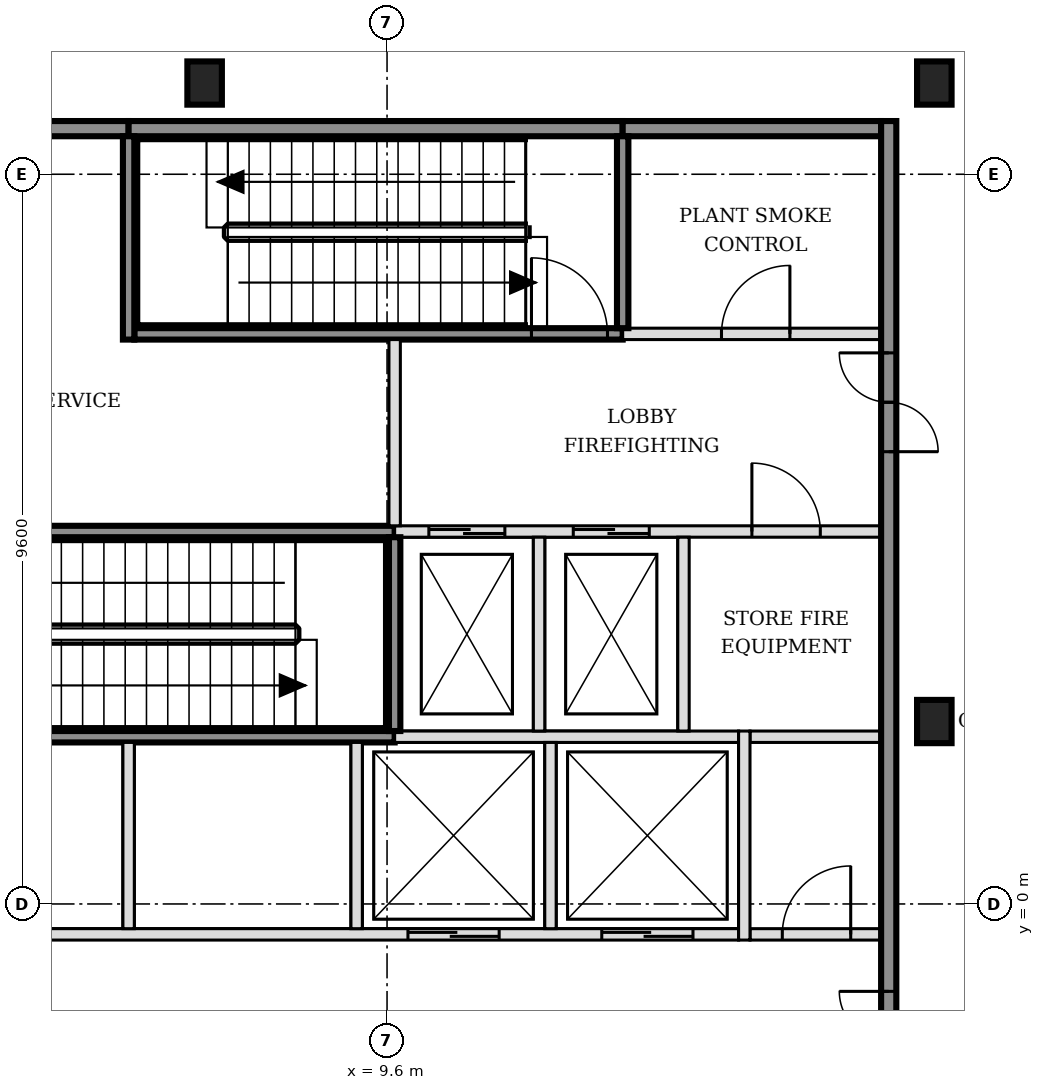
"""IFC4 building model, lengths in metres.
Left out: names, types, materials, properties, quantities, classifications, styles, units other than length and angle.
Written with IfcOpenShell. Run it as: python <this file> out.ifc"""

import sys

from ifc_helpers import new_model, si_unit, direction, frame, frame_2d, origin, origin_2d, place, context, subcontext, project, spatial, rectangle, i_section, extrude, element, fill, save


model = new_model("IFC4")
c1 = context("Model", 3, precision=1e-05, world=origin(), true_north=direction((0.0, 1.0)))
c2 = subcontext(c1, "Body", "Model", "MODEL_VIEW")
j1 = project(units=[si_unit("LENGTHUNIT", "METRE"), si_unit("PLANEANGLEUNIT", "RADIAN")], contexts=[c1])
p1 = place(None, origin())
s1 = spatial("IfcSite", under=j1, at=p1, CompositionType="ELEMENT")
p2 = place(p1, origin())
s2 = spatial("IfcBuilding", under=s1, at=p2, CompositionType="ELEMENT")
p3 = place(p2, frame((0.0, 0.0, 21.0)))
s3 = spatial("IfcBuildingStorey", under=s2, at=p3, CompositionType="ELEMENT", Elevation=21.0)
for number, where, z_axis, x_axis in (
    (1, (16.8, 2.4, -0.2), (0.0, 0.0, 1.0), (1.0, 0.0, 0.0)),
    (2, (7.2, 10.8, -0.2), (0.0, 0.0, 1.0), (1.0, 0.0, 0.0)),
    (3, (16.8, 10.8, -0.2), (0.0, 0.0, 1.0), (1.0, 0.0, 0.0)),
):
    element("IfcColumn", number, at=place(p3, frame(where, z_axis=z_axis, x_axis=x_axis)), inside=s3, PredefinedType="COLUMN", context=c2, shape_type="SweptSolid", body=[
        extrude(i_section(OverallWidth=0.454, OverallDepth=0.569, WebThickness=0.078, FlangeThickness=0.125, FilletRadius=0.015, at=origin_2d()), origin(), (0.0, 0.0, 1.0), 4.8),
    ])
p4 = place(p3, frame((-1.7, -0.4, 0.0), z_axis=(0.0, 0.0, 1.0), x_axis=(1.0, 0.0, 0.0)))
e4 = element("IfcWall", 4, at=p4, inside=s3, PredefinedType="SOLIDWALL", context=c2, shape_type="SweptSolid", body=[
    extrude(rectangle(XDim=15.925, YDim=0.15, at=frame_2d((7.962, 0.0))), origin(), (0.0, 0.0, 1.0), 4.6),
])
p5 = place(p4, frame((0.6, 0.0, 0.0)))
e5 = element("IfcOpeningElement", 5, at=p5, cuts=e4, PredefinedType="OPENING", context=c2, shape_type="SweptSolid", body=[
    extrude(rectangle(XDim=1.1, YDim=2.1, at=frame_2d((0.55, 1.05))), frame((0.0, 0.085, 0.0), z_axis=(0.0, -1.0, 0.0), x_axis=(1.0, 0.0, 0.0)), (0.0, 0.0, 1.0), 0.17),
])
p6 = place(p4, frame((3.1, 0.0, 0.0)))
e6 = element("IfcOpeningElement", 6, at=p6, cuts=e4, PredefinedType="OPENING", context=c2, shape_type="SweptSolid", body=[
    extrude(rectangle(XDim=1.1, YDim=2.1, at=frame_2d((0.55, 1.05))), frame((0.0, 0.085, 0.0), z_axis=(0.0, -1.0, 0.0), x_axis=(1.0, 0.0, 0.0)), (0.0, 0.0, 1.0), 0.17),
])
p7 = place(p4, frame((11.575, 0.0, 0.0)))
e7 = element("IfcOpeningElement", 7, at=p7, cuts=e4, PredefinedType="OPENING", context=c2, shape_type="SweptSolid", body=[
    extrude(rectangle(XDim=1.2, YDim=2.1, at=frame_2d((0.6, 1.05))), frame((0.0, 0.085, 0.0), z_axis=(0.0, -1.0, 0.0), x_axis=(1.0, 0.0, 0.0)), (0.0, 0.0, 1.0), 0.17),
])
p8 = place(p4, frame((14.125, 0.0, 0.0)))
e8 = element("IfcOpeningElement", 8, at=p8, cuts=e4, PredefinedType="OPENING", context=c2, shape_type="SweptSolid", body=[
    extrude(rectangle(XDim=1.2, YDim=2.1, at=frame_2d((0.6, 1.05))), frame((0.0, 0.085, 0.0), z_axis=(0.0, -1.0, 0.0), x_axis=(1.0, 0.0, 0.0)), (0.0, 0.0, 1.0), 0.17),
])
p9 = place(p3, frame((14.375, -0.4, 0.0), z_axis=(0.0, 0.0, 1.0), x_axis=(1.0, 0.0, 0.0)))
e9 = element("IfcWall", 9, at=p9, inside=s3, PredefinedType="PARTITIONING", context=c2, shape_type="SweptSolid", body=[
    extrude(rectangle(XDim=1.725, YDim=0.15, at=frame_2d((0.863, 0.0))), origin(), (0.0, 0.0, 1.0), 4.6),
])
p10 = place(p9, frame((0.425, 0.0, 0.0)))
e10 = element("IfcOpeningElement", 10, at=p10, cuts=e9, PredefinedType="OPENING", context=c2, shape_type="SweptSolid", body=[
    extrude(rectangle(XDim=0.9, YDim=2.1, at=frame_2d((0.45, 1.05))), frame((0.0, 0.085, 0.0), z_axis=(0.0, -1.0, 0.0), x_axis=(1.0, 0.0, 0.0)), (0.0, 0.0, 1.0), 0.17),
])
p11 = place(p3, frame((3.2, 2.2, 0.0), z_axis=(0.0, 0.0, 1.0), x_axis=(1.0, 0.0, 0.0)))
e11 = element("IfcWall", 11, at=p11, inside=s3, PredefinedType="SOLIDWALL", context=c2, shape_type="SweptSolid", body=[
    extrude(rectangle(XDim=6.5, YDim=0.15, at=frame_2d((3.25, 0.0))), origin(), (0.0, 0.0, 1.0), 4.6),
])
p12 = place(p3, frame((9.7, 2.2, 0.0), z_axis=(0.0, 0.0, 1.0), x_axis=(1.0, 0.0, 0.0)))
e12 = element("IfcWall", 12, at=p12, inside=s3, PredefinedType="SOLIDWALL", context=c2, shape_type="SweptSolid", body=[
    extrude(rectangle(XDim=4.525, YDim=0.15, at=frame_2d((2.263, 0.0))), origin(), (0.0, 0.0, 1.0), 4.6),
])
p13 = place(p3, frame((14.375, 2.2, 0.0), z_axis=(0.0, 0.0, 1.0), x_axis=(1.0, 0.0, 0.0)))
e13 = element("IfcWall", 13, at=p13, inside=s3, PredefinedType="PARTITIONING", context=c2, shape_type="SweptSolid", body=[
    extrude(rectangle(XDim=1.725, YDim=0.15, at=frame_2d((0.863, 0.0))), origin(), (0.0, 0.0, 1.0), 4.6),
])
p14 = place(p3, frame((3.275, 4.9, 0.0), z_axis=(0.0, 0.0, 1.0), x_axis=(1.0, 0.0, 0.0)))
e14 = element("IfcWall", 14, at=p14, inside=s3, PredefinedType="SOLIDWALL", context=c2, shape_type="SweptSolid", body=[
    extrude(rectangle(XDim=6.425, YDim=0.15, at=frame_2d((3.212, 0.0))), origin(), (0.0, 0.0, 1.0), 4.6),
])
p15 = place(p14, frame((0.1, 0.0, 0.0)))
e15 = element("IfcOpeningElement", 15, at=p15, cuts=e14, PredefinedType="OPENING", context=c2, shape_type="SweptSolid", body=[
    extrude(rectangle(XDim=1.0, YDim=2.1, at=frame_2d((0.5, 1.05))), frame((0.0, 0.085, 0.0), z_axis=(0.0, -1.0, 0.0), x_axis=(1.0, 0.0, 0.0)), (0.0, 0.0, 1.0), 0.17),
])
p16 = place(p3, frame((9.7, 4.9, 0.0), z_axis=(0.0, 0.0, 1.0), x_axis=(1.0, 0.0, 0.0)))
e16 = element("IfcWall", 16, at=p16, inside=s3, PredefinedType="SOLIDWALL", context=c2, shape_type="SweptSolid", body=[
    extrude(rectangle(XDim=6.4, YDim=0.15, at=frame_2d((3.2, 0.0))), origin(), (0.0, 0.0, 1.0), 4.6),
])
p17 = place(p16, frame((0.45, 0.0, 0.0)))
e17 = element("IfcOpeningElement", 17, at=p17, cuts=e16, PredefinedType="OPENING", context=c2, shape_type="SweptSolid", body=[
    extrude(rectangle(XDim=1.0, YDim=2.1, at=frame_2d((0.5, 1.05))), frame((0.0, 0.085, 0.0), z_axis=(0.0, -1.0, 0.0), x_axis=(1.0, 0.0, 0.0)), (0.0, 0.0, 1.0), 0.17),
])
p18 = place(p16, frame((2.35, 0.0, 0.0)))
e18 = element("IfcOpeningElement", 18, at=p18, cuts=e16, PredefinedType="OPENING", context=c2, shape_type="SweptSolid", body=[
    extrude(rectangle(XDim=1.0, YDim=2.1, at=frame_2d((0.5, 1.05))), frame((0.0, 0.085, 0.0), z_axis=(0.0, -1.0, 0.0), x_axis=(1.0, 0.0, 0.0)), (0.0, 0.0, 1.0), 0.17),
])
p19 = place(p16, frame((4.7, 0.0, 0.0)))
e19 = element("IfcOpeningElement", 19, at=p19, cuts=e16, PredefinedType="OPENING", context=c2, shape_type="SweptSolid", body=[
    extrude(rectangle(XDim=0.9, YDim=2.1, at=frame_2d((0.45, 1.05))), frame((0.0, 0.085, 0.0), z_axis=(0.0, -1.0, 0.0), x_axis=(1.0, 0.0, 0.0)), (0.0, 0.0, 1.0), 0.17),
])
p20 = place(p3, frame((6.275, 7.5, 0.0), z_axis=(0.0, 0.0, 1.0), x_axis=(1.0, 0.0, 0.0)))
e20 = element("IfcWall", 20, at=p20, inside=s3, PredefinedType="SOLIDWALL", context=c2, shape_type="SweptSolid", body=[
    extrude(rectangle(XDim=6.425, YDim=0.15, at=frame_2d((3.212, 0.0))), origin(), (0.0, 0.0, 1.0), 4.6),
])
p21 = place(p20, frame((5.225, 0.0, 0.0)))
e21 = element("IfcOpeningElement", 21, at=p21, cuts=e20, PredefinedType="OPENING", context=c2, shape_type="SweptSolid", body=[
    extrude(rectangle(XDim=1.0, YDim=2.1, at=frame_2d((0.5, 1.05))), frame((0.0, 0.085, 0.0), z_axis=(0.0, -1.0, 0.0), x_axis=(1.0, 0.0, 0.0)), (0.0, 0.0, 1.0), 0.17),
])
p22 = place(p3, frame((12.7, 7.5, 0.0), z_axis=(0.0, 0.0, 1.0), x_axis=(1.0, 0.0, 0.0)))
e22 = element("IfcWall", 22, at=p22, inside=s3, PredefinedType="SOLIDWALL", context=c2, shape_type="SweptSolid", body=[
    extrude(rectangle(XDim=3.4, YDim=0.15, at=frame_2d((1.7, 0.0))), origin(), (0.0, 0.0, 1.0), 4.6),
])
p23 = place(p22, frame((1.3, 0.0, 0.0)))
e23 = element("IfcOpeningElement", 23, at=p23, cuts=e22, PredefinedType="OPENING", context=c2, shape_type="SweptSolid", body=[
    extrude(rectangle(XDim=0.9, YDim=2.1, at=frame_2d((0.45, 1.05))), frame((0.0, 0.085, 0.0), z_axis=(0.0, -1.0, 0.0), x_axis=(1.0, 0.0, 0.0)), (0.0, 0.0, 1.0), 0.17),
])
p24 = place(p3, frame((-1.7, 10.2, 0.0), z_axis=(0.0, 0.0, 1.0), x_axis=(1.0, 0.0, 0.0)))
e24 = element("IfcWall", 24, at=p24, inside=s3, PredefinedType="SOLIDWALL", context=c2, shape_type="SweptSolid", body=[
    extrude(rectangle(XDim=7.9, YDim=0.2, at=frame_2d((3.95, 0.0))), origin(), (0.0, 0.0, 1.0), 4.6),
])
p25 = place(p3, frame((6.2, 10.2, 0.0), z_axis=(0.0, 0.0, 1.0), x_axis=(1.0, 0.0, 0.0)))
e25 = element("IfcWall", 25, at=p25, inside=s3, PredefinedType="SOLIDWALL", context=c2, shape_type="SweptSolid", body=[
    extrude(rectangle(XDim=6.5, YDim=0.2, at=frame_2d((3.25, 0.0))), origin(), (0.0, 0.0, 1.0), 4.6),
])
p26 = place(p3, frame((12.7, 10.2, 0.0), z_axis=(0.0, 0.0, 1.0), x_axis=(1.0, 0.0, 0.0)))
e26 = element("IfcWall", 26, at=p26, inside=s3, PredefinedType="SOLIDWALL", context=c2, shape_type="SweptSolid", body=[
    extrude(rectangle(XDim=3.4, YDim=0.2, at=frame_2d((1.7, 0.0))), origin(), (0.0, 0.0, 1.0), 4.6),
])
p27 = place(p3, frame((6.2, -0.325, 0.0), z_axis=(0.0, 0.0, 1.0), x_axis=(0.0, 1.0, 0.0)))
e27 = element("IfcWall", 27, at=p27, inside=s3, PredefinedType="SOLIDWALL", context=c2, shape_type="SweptSolid", body=[
    extrude(rectangle(XDim=2.45, YDim=0.15, at=frame_2d((1.225, 0.0))), origin(), (0.0, 0.0, 1.0), 4.6),
])
p28 = place(p3, frame((6.2, 7.425, 0.0), z_axis=(0.0, 0.0, 1.0), x_axis=(0.0, 1.0, 0.0)))
e28 = element("IfcWall", 28, at=p28, inside=s3, PredefinedType="SOLIDWALL", context=c2, shape_type="SweptSolid", body=[
    extrude(rectangle(XDim=2.675, YDim=0.15, at=frame_2d((1.337, 0.0))), origin(), (0.0, 0.0, 1.0), 4.6),
])
p29 = place(p3, frame((9.2, -0.325, 0.0), z_axis=(0.0, 0.0, 1.0), x_axis=(0.0, 1.0, 0.0)))
e29 = element("IfcWall", 29, at=p29, inside=s3, PredefinedType="SOLIDWALL", context=c2, shape_type="SweptSolid", body=[
    extrude(rectangle(XDim=2.45, YDim=0.15, at=frame_2d((1.225, 0.0))), origin(), (0.0, 0.0, 1.0), 4.6),
])
p30 = place(p3, frame((9.7, 2.275, 0.0), z_axis=(0.0, 0.0, 1.0), x_axis=(0.0, 1.0, 0.0)))
e30 = element("IfcWall", 30, at=p30, inside=s3, PredefinedType="SOLIDWALL", context=c2, shape_type="SweptSolid", body=[
    extrude(rectangle(XDim=2.55, YDim=0.15, at=frame_2d((1.275, 0.0))), origin(), (0.0, 0.0, 1.0), 4.6),
])
p31 = place(p3, frame((9.7, 4.975, 0.0), z_axis=(0.0, 0.0, 1.0), x_axis=(0.0, 1.0, 0.0)))
e31 = element("IfcWall", 31, at=p31, inside=s3, PredefinedType="SOLIDWALL", context=c2, shape_type="SweptSolid", body=[
    extrude(rectangle(XDim=2.45, YDim=0.15, at=frame_2d((1.225, 0.0))), origin(), (0.0, 0.0, 1.0), 4.6),
])
p32 = place(p3, frame((11.6, 2.275, 0.0), z_axis=(0.0, 0.0, 1.0), x_axis=(0.0, 1.0, 0.0)))
e32 = element("IfcWall", 32, at=p32, inside=s3, PredefinedType="SOLIDWALL", context=c2, shape_type="SweptSolid", body=[
    extrude(rectangle(XDim=2.55, YDim=0.15, at=frame_2d((1.275, 0.0))), origin(), (0.0, 0.0, 1.0), 4.6),
])
p33 = place(p3, frame((11.75, -0.325, 0.0), z_axis=(0.0, 0.0, 1.0), x_axis=(0.0, 1.0, 0.0)))
e33 = element("IfcWall", 33, at=p33, inside=s3, PredefinedType="SOLIDWALL", context=c2, shape_type="SweptSolid", body=[
    extrude(rectangle(XDim=2.45, YDim=0.15, at=frame_2d((1.225, 0.0))), origin(), (0.0, 0.0, 1.0), 4.6),
])
p34 = place(p3, frame((12.7, 7.575, 0.0), z_axis=(0.0, 0.0, 1.0), x_axis=(0.0, 1.0, 0.0)))
e34 = element("IfcWall", 34, at=p34, inside=s3, PredefinedType="SOLIDWALL", context=c2, shape_type="SweptSolid", body=[
    extrude(rectangle(XDim=2.525, YDim=0.15, at=frame_2d((1.263, 0.0))), origin(), (0.0, 0.0, 1.0), 4.6),
])
p35 = place(p3, frame((13.5, 2.275, 0.0), z_axis=(0.0, 0.0, 1.0), x_axis=(0.0, 1.0, 0.0)))
e35 = element("IfcWall", 35, at=p35, inside=s3, PredefinedType="SOLIDWALL", context=c2, shape_type="SweptSolid", body=[
    extrude(rectangle(XDim=2.55, YDim=0.15, at=frame_2d((1.275, 0.0))), origin(), (0.0, 0.0, 1.0), 4.6),
])
p36 = place(p3, frame((14.3, -0.475, 0.0), z_axis=(0.0, 0.0, 1.0), x_axis=(0.0, 1.0, 0.0)))
e36 = element("IfcWall", 36, at=p36, inside=s3, PredefinedType="SOLIDWALL", context=c2, shape_type="SweptSolid", body=[
    extrude(rectangle(XDim=2.75, YDim=0.15, at=frame_2d((1.375, 0.0))), origin(), (0.0, 0.0, 1.0), 4.6),
])
p37 = place(p3, frame((16.2, -5.5, 0.0), z_axis=(0.0, 0.0, 1.0), x_axis=(0.0, 1.0, 0.0)))
e37 = element("IfcWall", 37, at=p37, inside=s3, PredefinedType="SOLIDWALL", context=c2, shape_type="SweptSolid", body=[
    extrude(rectangle(XDim=15.8, YDim=0.2, at=frame_2d((7.9, 0.0))), origin(), (0.0, 0.0, 1.0), 4.6),
])
p38 = place(p37, frame((3.05, 0.0, 0.0)))
e38 = element("IfcOpeningElement", 38, at=p38, cuts=e37, PredefinedType="OPENING", context=c2, shape_type="SweptSolid", body=[
    extrude(rectangle(XDim=1.3, YDim=2.1, at=frame_2d((0.65, 1.05))), frame((0.0, 0.11, 0.0), z_axis=(0.0, -1.0, 0.0), x_axis=(1.0, 0.0, 0.0)), (0.0, 0.0, 1.0), 0.22),
])
p39 = place(p37, frame((11.45, 0.0, 0.0)))
e39 = element("IfcOpeningElement", 39, at=p39, cuts=e37, PredefinedType="OPENING", context=c2, shape_type="SweptSolid", body=[
    extrude(rectangle(XDim=1.3, YDim=2.1, at=frame_2d((0.65, 1.05))), frame((0.0, 0.11, 0.0), z_axis=(0.0, -1.0, 0.0), x_axis=(1.0, 0.0, 0.0)), (0.0, 0.0, 1.0), 0.22),
])
p40 = place(p7, origin())
e40 = element("IfcDoor", 40, at=p40, inside=s3, OperationType="DOUBLE_DOOR_SLIDING", PredefinedType="DOOR", context=c2, shape_type="SweptSolid", body=[
    extrude(rectangle(XDim=1.2, YDim=2.1, at=frame_2d((0.6, 1.05))), frame((0.0, 0.025, 0.0), z_axis=(0.0, -1.0, 0.0), x_axis=(1.0, 0.0, 0.0)), (0.0, 0.0, 1.0), 0.05),
])
fill(e7, e40)
p41 = place(p8, origin())
e41 = element("IfcDoor", 41, at=p41, inside=s3, OperationType="DOUBLE_DOOR_SLIDING", PredefinedType="DOOR", context=c2, shape_type="SweptSolid", body=[
    extrude(rectangle(XDim=1.2, YDim=2.1, at=frame_2d((0.6, 1.05))), frame((0.0, 0.025, 0.0), z_axis=(0.0, -1.0, 0.0), x_axis=(1.0, 0.0, 0.0)), (0.0, 0.0, 1.0), 0.05),
])
fill(e8, e41)
p42 = place(p17, origin())
e42 = element("IfcDoor", 42, at=p42, inside=s3, OperationType="DOUBLE_DOOR_SLIDING", PredefinedType="DOOR", context=c2, shape_type="SweptSolid", body=[
    extrude(rectangle(XDim=1.0, YDim=2.1, at=frame_2d((0.5, 1.05))), frame((0.0, 0.025, 0.0), z_axis=(0.0, -1.0, 0.0), x_axis=(1.0, 0.0, 0.0)), (0.0, 0.0, 1.0), 0.05),
])
fill(e17, e42)
p43 = place(p18, origin())
e43 = element("IfcDoor", 43, at=p43, inside=s3, OperationType="DOUBLE_DOOR_SLIDING", PredefinedType="DOOR", context=c2, shape_type="SweptSolid", body=[
    extrude(rectangle(XDim=1.0, YDim=2.1, at=frame_2d((0.5, 1.05))), frame((0.0, 0.025, 0.0), z_axis=(0.0, -1.0, 0.0), x_axis=(1.0, 0.0, 0.0)), (0.0, 0.0, 1.0), 0.05),
])
fill(e18, e43)
p44 = place(p21, origin())
e44 = element("IfcDoor", 44, at=p44, inside=s3, OperationType="SINGLE_SWING_LEFT", PredefinedType="DOOR", context=c2, shape_type="SweptSolid", body=[
    extrude(rectangle(XDim=1.0, YDim=2.1, at=frame_2d((0.5, 1.05))), frame((0.0, 0.025, 0.0), z_axis=(0.0, -1.0, 0.0), x_axis=(1.0, 0.0, 0.0)), (0.0, 0.0, 1.0), 0.05),
])
fill(e21, e44)
p45 = place(p38, origin())
e45 = element("IfcDoor", 45, at=p45, inside=s3, OperationType="DOUBLE_DOOR_SINGLE_SWING", PredefinedType="DOOR", context=c2, shape_type="SweptSolid", body=[
    extrude(rectangle(XDim=1.3, YDim=2.1, at=frame_2d((0.65, 1.05))), frame((0.0, 0.025, 0.0), z_axis=(0.0, -1.0, 0.0), x_axis=(1.0, 0.0, 0.0)), (0.0, 0.0, 1.0), 0.05),
])
fill(e38, e45)
p46 = place(p39, origin())
e46 = element("IfcDoor", 46, at=p46, inside=s3, OperationType="DOUBLE_DOOR_SINGLE_SWING", PredefinedType="DOOR", context=c2, shape_type="SweptSolid", body=[
    extrude(rectangle(XDim=1.3, YDim=2.1, at=frame_2d((0.65, 1.05))), frame((0.0, 0.025, 0.0), z_axis=(0.0, -1.0, 0.0), x_axis=(1.0, 0.0, 0.0)), (0.0, 0.0, 1.0), 0.05),
])
fill(e39, e46)
p47 = place(p10, origin())
e47 = element("IfcDoor", 47, at=p47, inside=s3, OperationType="SINGLE_SWING_RIGHT", PredefinedType="DOOR", context=c2, shape_type="SweptSolid", body=[
    extrude(rectangle(XDim=0.9, YDim=2.1, at=frame_2d((0.45, 1.05))), frame((0.0, 0.025, 0.0), z_axis=(0.0, -1.0, 0.0), x_axis=(1.0, 0.0, 0.0)), (0.0, 0.0, 1.0), 0.05),
])
fill(e10, e47)
p48 = place(p19, origin())
e48 = element("IfcDoor", 48, at=p48, inside=s3, OperationType="SINGLE_SWING_LEFT", PredefinedType="DOOR", context=c2, shape_type="SweptSolid", body=[
    extrude(rectangle(XDim=0.9, YDim=2.1, at=frame_2d((0.45, 1.05))), frame((0.0, 0.025, 0.0), z_axis=(0.0, -1.0, 0.0), x_axis=(1.0, 0.0, 0.0)), (0.0, 0.0, 1.0), 0.05),
])
fill(e19, e48)
p49 = place(p23, origin())
e49 = element("IfcDoor", 49, at=p49, inside=s3, OperationType="SINGLE_SWING_RIGHT", PredefinedType="DOOR", context=c2, shape_type="SweptSolid", body=[
    extrude(rectangle(XDim=0.9, YDim=2.1, at=frame_2d((0.45, 1.05))), frame((0.0, 0.025, 0.0), z_axis=(0.0, -1.0, 0.0), x_axis=(1.0, 0.0, 0.0)), (0.0, 0.0, 1.0), 0.05),
])
fill(e23, e49)
save(model, sys.argv[1])
